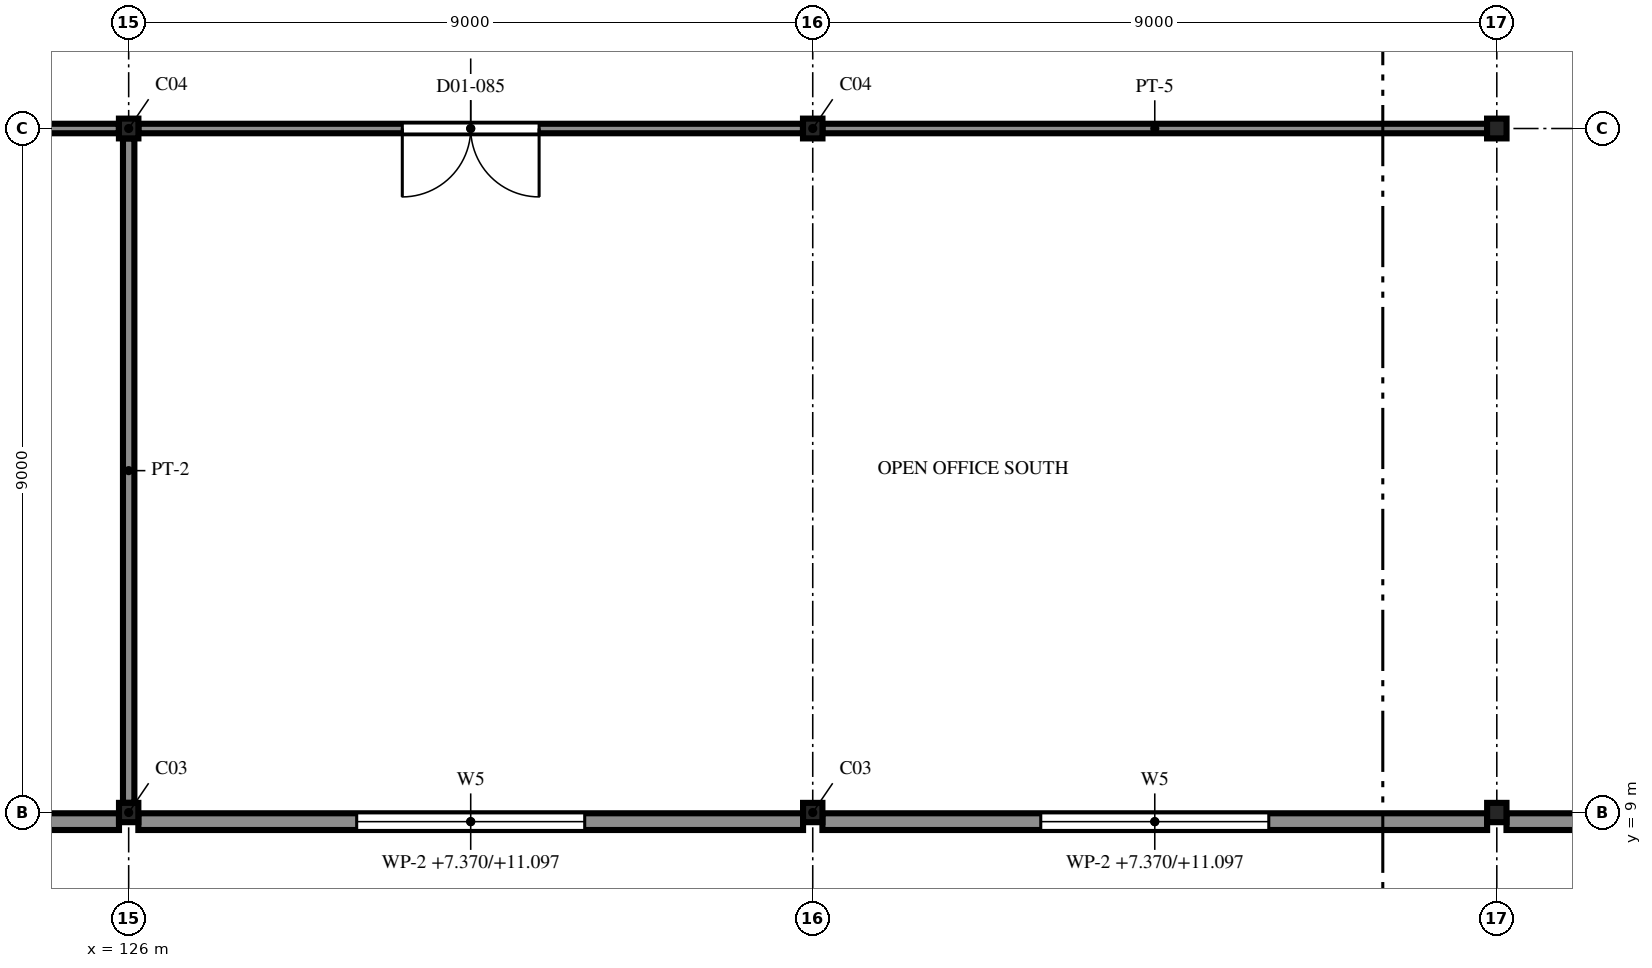
"""IFC4 building model, lengths in metres.
Left out: names, types, materials, properties, quantities, classifications, styles, units other than length and angle.
Written with IfcOpenShell. Run it as: python <this file> out.ifc"""

import sys

from ifc_helpers import new_model, si_unit, direction, frame, frame_2d, origin, origin_2d, place, context, subcontext, project, spatial, polyline, rectangle, i_section, outline, extrude, element, fill, save


model = new_model("IFC4")
c1 = context("Model", 3, precision=1e-05, world=origin(), true_north=direction((0.0, 1.0)))
c2 = subcontext(c1, "Body", "Model", "MODEL_VIEW")
j1 = project(units=[si_unit("LENGTHUNIT", "METRE"), si_unit("PLANEANGLEUNIT", "RADIAN")], contexts=[c1])
p1 = place(None, origin())
s1 = spatial("IfcSite", under=j1, at=p1, CompositionType="ELEMENT")
p2 = place(p1, origin())
s2 = spatial("IfcBuilding", under=s1, at=p2, CompositionType="ELEMENT")
p3 = place(p2, frame((0.0, 0.0, 7.5)))
s3 = spatial("IfcBuildingStorey", under=s2, at=p3, CompositionType="ELEMENT", Elevation=7.5)
p4 = place(p3, frame((126.0, 9.0, 0.0), z_axis=(0.0, 0.0, 1.0), x_axis=(1.0, 0.0, 0.0)))
e1 = element("IfcColumn", 1, at=p4, inside=s3, PredefinedType="COLUMN", context=c2, shape_type="SweptSolid", body=[
    extrude(i_section(OverallWidth=0.255, OverallDepth=0.254, WebThickness=0.009, FlangeThickness=0.014, FilletRadius=0.013, at=origin_2d()), origin(), (0.0, 0.0, 1.0), 4.2),
])
p5 = place(p3, frame((126.0, 18.0, 0.0), z_axis=(0.0, 0.0, 1.0), x_axis=(1.0, 0.0, 0.0)))
e2 = element("IfcColumn", 2, at=p5, inside=s3, PredefinedType="COLUMN", context=c2, shape_type="SweptSolid", body=[
    extrude(i_section(OverallWidth=0.256, OverallDepth=0.26, WebThickness=0.01, FlangeThickness=0.017, FilletRadius=0.013, at=origin_2d()), origin(), (0.0, 0.0, 1.0), 4.2),
])
p6 = place(p3, frame((135.0, 9.0, 0.0), z_axis=(0.0, 0.0, 1.0), x_axis=(1.0, 0.0, 0.0)))
e3 = element("IfcColumn", 3, at=p6, inside=s3, PredefinedType="COLUMN", context=c2, shape_type="SweptSolid", body=[
    extrude(i_section(OverallWidth=0.255, OverallDepth=0.254, WebThickness=0.009, FlangeThickness=0.014, FilletRadius=0.013, at=origin_2d()), origin(), (0.0, 0.0, 1.0), 4.2),
])
p7 = place(p3, frame((135.0, 18.0, 0.0), z_axis=(0.0, 0.0, 1.0), x_axis=(1.0, 0.0, 0.0)))
e4 = element("IfcColumn", 4, at=p7, inside=s3, PredefinedType="COLUMN", context=c2, shape_type="SweptSolid", body=[
    extrude(i_section(OverallWidth=0.256, OverallDepth=0.26, WebThickness=0.01, FlangeThickness=0.017, FilletRadius=0.013, at=origin_2d()), origin(), (0.0, 0.0, 1.0), 4.2),
])
p8 = place(p3, frame((144.0, 9.0, 0.0), z_axis=(0.0, 0.0, 1.0), x_axis=(1.0, 0.0, 0.0)))
e5 = element("IfcColumn", 5, at=p8, inside=s3, PredefinedType="COLUMN", context=c2, shape_type="SweptSolid", body=[
    extrude(i_section(OverallWidth=0.255, OverallDepth=0.254, WebThickness=0.009, FlangeThickness=0.014, FilletRadius=0.013, at=origin_2d()), origin(), (0.0, 0.0, 1.0), 4.2),
])
p9 = place(p3, frame((144.0, 18.0, 0.0), z_axis=(0.0, 0.0, 1.0), x_axis=(1.0, 0.0, 0.0)))
e6 = element("IfcColumn", 6, at=p9, inside=s3, PredefinedType="COLUMN", context=c2, shape_type="SweptSolid", body=[
    extrude(i_section(OverallWidth=0.256, OverallDepth=0.26, WebThickness=0.01, FlangeThickness=0.017, FilletRadius=0.013, at=origin_2d()), origin(), (0.0, 0.0, 1.0), 4.2),
])
p10 = place(p3, frame((117.127, 8.88, -0.13), z_axis=(0.0, 0.0, 1.0), x_axis=(1.0, 0.0, 0.0)))
e7 = element("IfcWall", 7, at=p10, inside=s3, PredefinedType="SOLIDWALL", context=c2, shape_type="SweptSolid", body=[
    extrude(rectangle(XDim=8.746, YDim=0.22, at=frame_2d((4.373, 0.0))), origin(), (0.0, 0.0, 1.0), 3.727),
])
p11 = place(p10, frame((2.873, 0.0, 1.03)))
e8 = element("IfcOpeningElement", 8, at=p11, cuts=e7, PredefinedType="OPENING", context=c2, shape_type="SweptSolid", body=[
    extrude(rectangle(XDim=3.0, YDim=2.1, at=frame_2d((1.5, 1.05))), frame((0.0, 0.12, 0.0), z_axis=(0.0, -1.0, 0.0), x_axis=(1.0, 0.0, 0.0)), (0.0, 0.0, 1.0), 0.24),
])
p12 = place(p3, frame((126.127, 8.88, -0.13), z_axis=(0.0, 0.0, 1.0), x_axis=(1.0, 0.0, 0.0)))
e9 = element("IfcWall", 9, at=p12, inside=s3, PredefinedType="SOLIDWALL", context=c2, shape_type="SweptSolid", body=[
    extrude(rectangle(XDim=8.746, YDim=0.22, at=frame_2d((4.373, 0.0))), origin(), (0.0, 0.0, 1.0), 3.727),
])
p13 = place(p12, frame((2.873, 0.0, 1.03)))
e10 = element("IfcOpeningElement", 10, at=p13, cuts=e9, PredefinedType="OPENING", context=c2, shape_type="SweptSolid", body=[
    extrude(rectangle(XDim=3.0, YDim=2.1, at=frame_2d((1.5, 1.05))), frame((0.0, 0.12, 0.0), z_axis=(0.0, -1.0, 0.0), x_axis=(1.0, 0.0, 0.0)), (0.0, 0.0, 1.0), 0.24),
])
p14 = place(p3, frame((135.127, 8.88, -0.13), z_axis=(0.0, 0.0, 1.0), x_axis=(1.0, 0.0, 0.0)))
e11 = element("IfcWall", 11, at=p14, inside=s3, PredefinedType="SOLIDWALL", context=c2, shape_type="SweptSolid", body=[
    extrude(rectangle(XDim=8.746, YDim=0.22, at=frame_2d((4.373, 0.0))), origin(), (0.0, 0.0, 1.0), 3.727),
])
p15 = place(p14, frame((2.873, 0.0, 1.03)))
e12 = element("IfcOpeningElement", 12, at=p15, cuts=e11, PredefinedType="OPENING", context=c2, shape_type="SweptSolid", body=[
    extrude(rectangle(XDim=3.0, YDim=2.1, at=frame_2d((1.5, 1.05))), frame((0.0, 0.12, 0.0), z_axis=(0.0, -1.0, 0.0), x_axis=(1.0, 0.0, 0.0)), (0.0, 0.0, 1.0), 0.24),
])
p16 = place(p3, frame((144.127, 8.88, -0.13), z_axis=(0.0, 0.0, 1.0), x_axis=(1.0, 0.0, 0.0)))
e13 = element("IfcWall", 13, at=p16, inside=s3, PredefinedType="SOLIDWALL", context=c2, shape_type="SweptSolid", body=[
    extrude(rectangle(XDim=8.746, YDim=0.22, at=frame_2d((4.373, 0.0))), origin(), (0.0, 0.0, 1.0), 3.727),
])
p17 = place(p16, frame((2.873, 0.0, 1.03)))
e14 = element("IfcOpeningElement", 14, at=p17, cuts=e13, PredefinedType="OPENING", context=c2, shape_type="SweptSolid", body=[
    extrude(rectangle(XDim=3.0, YDim=2.1, at=frame_2d((1.5, 1.05))), frame((0.0, 0.12, 0.0), z_axis=(0.0, -1.0, 0.0), x_axis=(1.0, 0.0, 0.0)), (0.0, 0.0, 1.0), 0.24),
])
p18 = place(p3, frame((143.872, 18.0, 0.0), z_axis=(0.0, 0.0, 1.0), x_axis=(-1.0, 0.0, 0.0)))
e15 = element("IfcWall", 15, at=p18, inside=s3, PredefinedType="PARTITIONING", context=c2, shape_type="SweptSolid", body=[
    extrude(rectangle(XDim=8.744, YDim=0.125, at=frame_2d((4.372, 0.0))), origin(), (0.0, 0.0, 1.0), 3.307),
])
p19 = place(p3, frame((134.872, 18.0, 0.0), z_axis=(0.0, 0.0, 1.0), x_axis=(-1.0, 0.0, 0.0)))
e16 = element("IfcWall", 16, at=p19, inside=s3, PredefinedType="PARTITIONING", context=c2, shape_type="SweptSolid", body=[
    extrude(rectangle(XDim=8.744, YDim=0.125, at=frame_2d((4.372, 0.0))), origin(), (0.0, 0.0, 1.0), 3.307),
])
p20 = place(p19, frame((3.472, 0.0, 0.0)))
e17 = element("IfcOpeningElement", 17, at=p20, cuts=e16, PredefinedType="OPENING", context=c2, shape_type="SweptSolid", body=[
    extrude(rectangle(XDim=1.8, YDim=2.1, at=frame_2d((0.9, 1.05))), frame((0.0, 0.073, 0.0), z_axis=(0.0, -1.0, 0.0), x_axis=(1.0, 0.0, 0.0)), (0.0, 0.0, 1.0), 0.145),
])
p21 = place(p3, frame((125.872, 18.0, 0.0), z_axis=(0.0, 0.0, 1.0), x_axis=(-1.0, 0.0, 0.0)))
e18 = element("IfcWall", 18, at=p21, inside=s3, PredefinedType="PARTITIONING", context=c2, shape_type="SweptSolid", body=[
    extrude(rectangle(XDim=8.744, YDim=0.125, at=frame_2d((4.372, 0.0))), origin(), (0.0, 0.0, 1.0), 3.307),
])
p22 = place(p21, frame((3.472, 0.0, 0.0)))
e19 = element("IfcOpeningElement", 19, at=p22, cuts=e18, PredefinedType="OPENING", context=c2, shape_type="SweptSolid", body=[
    extrude(rectangle(XDim=1.8, YDim=2.4, at=frame_2d((0.9, 1.2))), frame((0.0, 0.073, 0.0), z_axis=(0.0, -1.0, 0.0), x_axis=(1.0, 0.0, 0.0)), (0.0, 0.0, 1.0), 0.145),
])
p23 = place(p3, frame((126.0, 17.87, 0.0), z_axis=(0.0, 0.0, 1.0), x_axis=(0.0, -1.0, 0.0)))
e20 = element("IfcWall", 20, at=p23, inside=s3, PredefinedType="PARTITIONING", context=c2, shape_type="SweptSolid", body=[
    extrude(rectangle(XDim=8.743, YDim=0.15, at=frame_2d((4.372, 0.0))), origin(), (0.0, 0.0, 1.0), 3.307),
])
p24 = place(p13, origin())
e21 = element("IfcWindow", 21, at=p24, inside=s3, PartitioningType="TRIPLE_PANEL_VERTICAL", PredefinedType="WINDOW", context=c2, shape_type="SweptSolid", body=[
    extrude(outline(polyline([(0.0, 0.0), (3.0, 0.0), (3.0, 2.1), (0.0, 2.1), (0.0, 0.0)]), holes=[polyline([(0.07, 0.07), (2.93, 0.07), (2.93, 2.03), (0.07, 2.03), (0.07, 0.07)])]), frame((0.0, 0.03, 0.0), z_axis=(0.0, -1.0, 0.0), x_axis=(1.0, 0.0, 0.0)), (0.0, 0.0, 1.0), 0.06),
    extrude(rectangle(XDim=0.04, YDim=1.96, at=frame_2d((1.017, 1.05))), frame((0.0, 0.022, 0.0), z_axis=(0.0, -1.0, 0.0), x_axis=(1.0, 0.0, 0.0)), (0.0, 0.0, 1.0), 0.044),
    extrude(rectangle(XDim=0.04, YDim=1.96, at=frame_2d((1.983, 1.05))), frame((0.0, 0.022, 0.0), z_axis=(0.0, -1.0, 0.0), x_axis=(1.0, 0.0, 0.0)), (0.0, 0.0, 1.0), 0.044),
    extrude(outline(polyline([(0.07, 0.07), (0.997, 0.07), (0.997, 2.03), (0.07, 2.03), (0.07, 0.07)]), holes=[polyline([(0.1, 0.1), (0.967, 0.1), (0.967, 2.0), (0.1, 2.0), (0.1, 0.1)])]), frame((0.0, 0.022, 0.0), z_axis=(0.0, -1.0, 0.0), x_axis=(1.0, 0.0, 0.0)), (0.0, 0.0, 1.0), 0.045),
    extrude(rectangle(XDim=0.866, YDim=1.9, at=frame_2d((0.533, 1.05))), frame((0.0, 0.006, 0.0), z_axis=(0.0, -1.0, 0.0), x_axis=(1.0, 0.0, 0.0)), (0.0, 0.0, 1.0), 0.012),
    extrude(outline(polyline([(1.037, 0.07), (1.963, 0.07), (1.963, 2.03), (1.037, 2.03), (1.037, 0.07)]), holes=[polyline([(1.067, 0.1), (1.933, 0.1), (1.933, 2.0), (1.067, 2.0), (1.067, 0.1)])]), frame((0.0, 0.022, 0.0), z_axis=(0.0, -1.0, 0.0), x_axis=(1.0, 0.0, 0.0)), (0.0, 0.0, 1.0), 0.045),
    extrude(rectangle(XDim=0.867, YDim=1.9, at=frame_2d((1.5, 1.05))), frame((0.0, 0.006, 0.0), z_axis=(0.0, -1.0, 0.0), x_axis=(1.0, 0.0, 0.0)), (0.0, 0.0, 1.0), 0.012),
    extrude(outline(polyline([(2.003, 0.07), (2.93, 0.07), (2.93, 2.03), (2.003, 2.03), (2.003, 0.07)]), holes=[polyline([(2.033, 0.1), (2.9, 0.1), (2.9, 2.0), (2.033, 2.0), (2.033, 0.1)])]), frame((0.0, 0.022, 0.0), z_axis=(0.0, -1.0, 0.0), x_axis=(1.0, 0.0, 0.0)), (0.0, 0.0, 1.0), 0.045),
    extrude(rectangle(XDim=0.866, YDim=1.9, at=frame_2d((2.467, 1.05))), frame((0.0, 0.006, 0.0), z_axis=(0.0, -1.0, 0.0), x_axis=(1.0, 0.0, 0.0)), (0.0, 0.0, 1.0), 0.012),
])
fill(e10, e21)
p25 = place(p15, origin())
e22 = element("IfcWindow", 22, at=p25, inside=s3, PartitioningType="TRIPLE_PANEL_VERTICAL", PredefinedType="WINDOW", context=c2, shape_type="SweptSolid", body=[
    extrude(outline(polyline([(0.0, 0.0), (3.0, 0.0), (3.0, 2.1), (0.0, 2.1), (0.0, 0.0)]), holes=[polyline([(0.07, 0.07), (2.93, 0.07), (2.93, 2.03), (0.07, 2.03), (0.07, 0.07)])]), frame((0.0, 0.03, 0.0), z_axis=(0.0, -1.0, 0.0), x_axis=(1.0, 0.0, 0.0)), (0.0, 0.0, 1.0), 0.06),
    extrude(rectangle(XDim=0.04, YDim=1.96, at=frame_2d((1.017, 1.05))), frame((0.0, 0.022, 0.0), z_axis=(0.0, -1.0, 0.0), x_axis=(1.0, 0.0, 0.0)), (0.0, 0.0, 1.0), 0.044),
    extrude(rectangle(XDim=0.04, YDim=1.96, at=frame_2d((1.983, 1.05))), frame((0.0, 0.022, 0.0), z_axis=(0.0, -1.0, 0.0), x_axis=(1.0, 0.0, 0.0)), (0.0, 0.0, 1.0), 0.044),
    extrude(outline(polyline([(0.07, 0.07), (0.997, 0.07), (0.997, 2.03), (0.07, 2.03), (0.07, 0.07)]), holes=[polyline([(0.1, 0.1), (0.967, 0.1), (0.967, 2.0), (0.1, 2.0), (0.1, 0.1)])]), frame((0.0, 0.022, 0.0), z_axis=(0.0, -1.0, 0.0), x_axis=(1.0, 0.0, 0.0)), (0.0, 0.0, 1.0), 0.045),
    extrude(rectangle(XDim=0.866, YDim=1.9, at=frame_2d((0.533, 1.05))), frame((0.0, 0.006, 0.0), z_axis=(0.0, -1.0, 0.0), x_axis=(1.0, 0.0, 0.0)), (0.0, 0.0, 1.0), 0.012),
    extrude(outline(polyline([(1.037, 0.07), (1.963, 0.07), (1.963, 2.03), (1.037, 2.03), (1.037, 0.07)]), holes=[polyline([(1.067, 0.1), (1.933, 0.1), (1.933, 2.0), (1.067, 2.0), (1.067, 0.1)])]), frame((0.0, 0.022, 0.0), z_axis=(0.0, -1.0, 0.0), x_axis=(1.0, 0.0, 0.0)), (0.0, 0.0, 1.0), 0.045),
    extrude(rectangle(XDim=0.867, YDim=1.9, at=frame_2d((1.5, 1.05))), frame((0.0, 0.006, 0.0), z_axis=(0.0, -1.0, 0.0), x_axis=(1.0, 0.0, 0.0)), (0.0, 0.0, 1.0), 0.012),
    extrude(outline(polyline([(2.003, 0.07), (2.93, 0.07), (2.93, 2.03), (2.003, 2.03), (2.003, 0.07)]), holes=[polyline([(2.033, 0.1), (2.9, 0.1), (2.9, 2.0), (2.033, 2.0), (2.033, 0.1)])]), frame((0.0, 0.022, 0.0), z_axis=(0.0, -1.0, 0.0), x_axis=(1.0, 0.0, 0.0)), (0.0, 0.0, 1.0), 0.045),
    extrude(rectangle(XDim=0.866, YDim=1.9, at=frame_2d((2.467, 1.05))), frame((0.0, 0.006, 0.0), z_axis=(0.0, -1.0, 0.0), x_axis=(1.0, 0.0, 0.0)), (0.0, 0.0, 1.0), 0.012),
])
fill(e12, e22)
p26 = place(p20, origin())
e23 = element("IfcDoor", 23, at=p26, inside=s3, OperationType="DOUBLE_DOOR_SINGLE_SWING", PredefinedType="DOOR", context=c2, shape_type="SweptSolid", body=[
    extrude(outline(polyline([(0.0, 0.0), (0.07, 0.0), (0.07, 2.03), (1.73, 2.03), (1.73, 0.0), (1.8, 0.0), (1.8, 2.1), (0.0, 2.1), (0.0, 0.0)])), frame((0.0, 0.025, 0.0), z_axis=(0.0, -1.0, 0.0), x_axis=(1.0, 0.0, 0.0)), (0.0, 0.0, 1.0), 0.05),
    extrude(outline(polyline([(0.074, 0.01), (0.897, 0.01), (0.897, 2.026), (0.074, 2.026), (0.074, 0.01)]), holes=[polyline([(0.194, 0.16), (0.777, 0.16), (0.777, 1.01), (0.194, 1.01), (0.194, 0.16)]), polyline([(0.335, 1.16), (0.635, 1.16), (0.635, 1.76), (0.335, 1.76), (0.335, 1.16)])]), frame((0.0, 0.017, 0.0), z_axis=(0.0, -1.0, 0.0), x_axis=(1.0, 0.0, 0.0)), (0.0, 0.0, 1.0), 0.035),
    extrude(rectangle(XDim=0.583, YDim=0.85, at=frame_2d((0.485, 0.585))), frame((0.0, 0.009, 0.0), z_axis=(0.0, -1.0, 0.0), x_axis=(1.0, 0.0, 0.0)), (0.0, 0.0, 1.0), 0.017),
    extrude(rectangle(XDim=0.3, YDim=0.6, at=frame_2d((0.485, 1.46))), frame((0.0, 0.006, 0.0), z_axis=(0.0, -1.0, 0.0), x_axis=(1.0, 0.0, 0.0)), (0.0, 0.0, 1.0), 0.012),
    extrude(outline(polyline([(0.903, 0.01), (1.726, 0.01), (1.726, 2.026), (0.903, 2.026), (0.903, 0.01)]), holes=[polyline([(1.023, 0.16), (1.606, 0.16), (1.606, 1.01), (1.023, 1.01), (1.023, 0.16)]), polyline([(1.165, 1.16), (1.465, 1.16), (1.465, 1.76), (1.165, 1.76), (1.165, 1.16)])]), frame((0.0, 0.017, 0.0), z_axis=(0.0, -1.0, 0.0), x_axis=(1.0, 0.0, 0.0)), (0.0, 0.0, 1.0), 0.035),
    extrude(rectangle(XDim=0.583, YDim=0.85, at=frame_2d((1.314, 0.585))), frame((0.0, 0.009, 0.0), z_axis=(0.0, -1.0, 0.0), x_axis=(1.0, 0.0, 0.0)), (0.0, 0.0, 1.0), 0.017),
    extrude(rectangle(XDim=0.3, YDim=0.6, at=frame_2d((1.314, 1.46))), frame((0.0, 0.006, 0.0), z_axis=(0.0, -1.0, 0.0), x_axis=(1.0, 0.0, 0.0)), (0.0, 0.0, 1.0), 0.012),
])
fill(e17, e23)
save(model, sys.argv[1])
